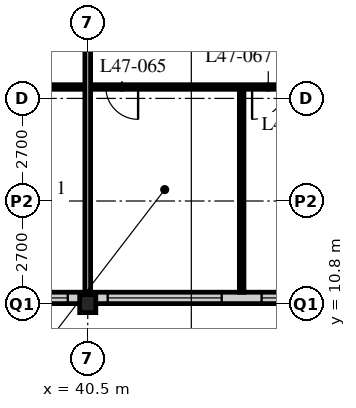
"""IFC4 building model, lengths in metres.
Left out: names, types, materials, properties, quantities, classifications, styles, units other than length and angle.
Written with IfcOpenShell. Run it as: python <this file> out.ifc"""

import sys

from ifc_helpers import new_model, si_unit, direction, frame, frame_2d, origin, origin_2d, place, context, subcontext, project, spatial, rectangle, i_section, extrude, element, fill, save


model = new_model("IFC4")
c1 = context("Model", 3, precision=1e-05, world=origin(), true_north=direction((0.0, 1.0)))
c2 = subcontext(c1, "Body", "Model", "MODEL_VIEW")
j1 = project(units=[si_unit("LENGTHUNIT", "METRE"), si_unit("PLANEANGLEUNIT", "RADIAN")], contexts=[c1])
p1 = place(None, origin())
s1 = spatial("IfcSite", under=j1, at=p1, CompositionType="ELEMENT")
p2 = place(p1, origin())
s2 = spatial("IfcBuilding", under=s1, at=p2, CompositionType="ELEMENT")
p3 = place(p2, frame((0.0, 0.0, 184.8)))
s3 = spatial("IfcBuildingStorey", under=s2, at=p3, CompositionType="ELEMENT", Elevation=184.8)
p4 = place(p3, frame((40.5, 10.8, 0.0), z_axis=(0.0, 0.0, 1.0), x_axis=(1.0, 0.0, 0.0)))
e1 = element("IfcColumn", 1, at=p4, inside=s3, PredefinedType="COLUMN", context=c2, shape_type="SweptSolid", body=[
    extrude(i_section(OverallWidth=0.424, OverallDepth=0.475, WebThickness=0.048, FlangeThickness=0.077, FilletRadius=0.015, at=origin_2d()), origin(), (0.0, 0.0, 1.0), 3.6),
])
p5 = place(p3, frame((8.4, 10.95, 0.0), z_axis=(0.0, 0.0, 1.0), x_axis=(1.0, 0.0, 0.0)))
e2 = element("IfcWall", 2, at=p5, inside=s3, PredefinedType="SOLIDWALL", context=c2, shape_type="SweptSolid", body=[
    extrude(rectangle(XDim=40.2, YDim=0.3, at=frame_2d((20.1, 0.0))), origin(), (0.0, 0.0, 1.0), 3.39),
])
p6 = place(p5, frame((0.225, 0.0, 0.6)))
e3 = element("IfcOpeningElement", 3, at=p6, cuts=e2, PredefinedType="OPENING", context=c2, shape_type="SweptSolid", body=[
    extrude(rectangle(XDim=3.0, YDim=2.4, at=frame_2d((1.5, 1.2))), frame((0.0, 0.16, 0.0), z_axis=(0.0, -1.0, 0.0), x_axis=(1.0, 0.0, 0.0)), (0.0, 0.0, 1.0), 0.32),
])
p7 = place(p5, frame((4.275, 0.0, 0.6)))
e4 = element("IfcOpeningElement", 4, at=p7, cuts=e2, PredefinedType="OPENING", context=c2, shape_type="SweptSolid", body=[
    extrude(rectangle(XDim=3.0, YDim=2.4, at=frame_2d((1.5, 1.2))), frame((0.0, 0.16, 0.0), z_axis=(0.0, -1.0, 0.0), x_axis=(1.0, 0.0, 0.0)), (0.0, 0.0, 1.0), 0.32),
])
p8 = place(p5, frame((8.325, 0.0, 0.6)))
e5 = element("IfcOpeningElement", 5, at=p8, cuts=e2, PredefinedType="OPENING", context=c2, shape_type="SweptSolid", body=[
    extrude(rectangle(XDim=3.0, YDim=2.4, at=frame_2d((1.5, 1.2))), frame((0.0, 0.16, 0.0), z_axis=(0.0, -1.0, 0.0), x_axis=(1.0, 0.0, 0.0)), (0.0, 0.0, 1.0), 0.32),
])
p9 = place(p5, frame((12.375, 0.0, 0.6)))
e6 = element("IfcOpeningElement", 6, at=p9, cuts=e2, PredefinedType="OPENING", context=c2, shape_type="SweptSolid", body=[
    extrude(rectangle(XDim=3.0, YDim=2.4, at=frame_2d((1.5, 1.2))), frame((0.0, 0.16, 0.0), z_axis=(0.0, -1.0, 0.0), x_axis=(1.0, 0.0, 0.0)), (0.0, 0.0, 1.0), 0.32),
])
p10 = place(p5, frame((16.425, 0.0, 0.6)))
e7 = element("IfcOpeningElement", 7, at=p10, cuts=e2, PredefinedType="OPENING", context=c2, shape_type="SweptSolid", body=[
    extrude(rectangle(XDim=3.0, YDim=2.4, at=frame_2d((1.5, 1.2))), frame((0.0, 0.16, 0.0), z_axis=(0.0, -1.0, 0.0), x_axis=(1.0, 0.0, 0.0)), (0.0, 0.0, 1.0), 0.32),
])
p11 = place(p5, frame((20.475, 0.0, 0.6)))
e8 = element("IfcOpeningElement", 8, at=p11, cuts=e2, PredefinedType="OPENING", context=c2, shape_type="SweptSolid", body=[
    extrude(rectangle(XDim=3.0, YDim=2.4, at=frame_2d((1.5, 1.2))), frame((0.0, 0.16, 0.0), z_axis=(0.0, -1.0, 0.0), x_axis=(1.0, 0.0, 0.0)), (0.0, 0.0, 1.0), 0.32),
])
p12 = place(p5, frame((24.525, 0.0, 0.6)))
e9 = element("IfcOpeningElement", 9, at=p12, cuts=e2, PredefinedType="OPENING", context=c2, shape_type="SweptSolid", body=[
    extrude(rectangle(XDim=3.0, YDim=2.4, at=frame_2d((1.5, 1.2))), frame((0.0, 0.16, 0.0), z_axis=(0.0, -1.0, 0.0), x_axis=(1.0, 0.0, 0.0)), (0.0, 0.0, 1.0), 0.32),
])
p13 = place(p5, frame((28.575, 0.0, 0.6)))
e10 = element("IfcOpeningElement", 10, at=p13, cuts=e2, PredefinedType="OPENING", context=c2, shape_type="SweptSolid", body=[
    extrude(rectangle(XDim=3.0, YDim=2.4, at=frame_2d((1.5, 1.2))), frame((0.0, 0.16, 0.0), z_axis=(0.0, -1.0, 0.0), x_axis=(1.0, 0.0, 0.0)), (0.0, 0.0, 1.0), 0.32),
])
p14 = place(p5, frame((32.625, 0.0, 0.6)))
e11 = element("IfcOpeningElement", 11, at=p14, cuts=e2, PredefinedType="OPENING", context=c2, shape_type="SweptSolid", body=[
    extrude(rectangle(XDim=3.0, YDim=2.4, at=frame_2d((1.5, 1.2))), frame((0.0, 0.16, 0.0), z_axis=(0.0, -1.0, 0.0), x_axis=(1.0, 0.0, 0.0)), (0.0, 0.0, 1.0), 0.32),
])
p15 = place(p5, frame((36.675, 0.0, 0.6)))
e12 = element("IfcOpeningElement", 12, at=p15, cuts=e2, PredefinedType="OPENING", context=c2, shape_type="SweptSolid", body=[
    extrude(rectangle(XDim=3.0, YDim=2.4, at=frame_2d((1.5, 1.2))), frame((0.0, 0.16, 0.0), z_axis=(0.0, -1.0, 0.0), x_axis=(1.0, 0.0, 0.0)), (0.0, 0.0, 1.0), 0.32),
])
p16 = place(p3, frame((8.15, 16.5, 0.0), z_axis=(0.0, 0.0, 1.0), x_axis=(1.0, 0.0, 0.0)))
e13 = element("IfcWall", 13, at=p16, inside=s3, PredefinedType="PARTITIONING", context=c2, shape_type="SweptSolid", body=[
    extrude(rectangle(XDim=40.4, YDim=0.12, at=frame_2d((20.2, 0.0))), origin(), (0.0, 0.0, 1.0), 3.39),
])
p17 = place(p16, frame((9.025, 0.0, 0.0)))
e14 = element("IfcOpeningElement", 14, at=p17, cuts=e13, PredefinedType="OPENING", context=c2, shape_type="SweptSolid", body=[
    extrude(rectangle(XDim=0.85, YDim=2.1, at=frame_2d((0.425, 1.05))), frame((0.0, 0.07, 0.0), z_axis=(0.0, -1.0, 0.0), x_axis=(1.0, 0.0, 0.0)), (0.0, 0.0, 1.0), 0.14),
])
p18 = place(p16, frame((12.425, 0.0, 0.0)))
e15 = element("IfcOpeningElement", 15, at=p18, cuts=e13, PredefinedType="OPENING", context=c2, shape_type="SweptSolid", body=[
    extrude(rectangle(XDim=0.85, YDim=2.1, at=frame_2d((0.425, 1.05))), frame((0.0, 0.07, 0.0), z_axis=(0.0, -1.0, 0.0), x_axis=(1.0, 0.0, 0.0)), (0.0, 0.0, 1.0), 0.14),
])
p19 = place(p16, frame((17.125, 0.0, 0.0)))
e16 = element("IfcOpeningElement", 16, at=p19, cuts=e13, PredefinedType="OPENING", context=c2, shape_type="SweptSolid", body=[
    extrude(rectangle(XDim=0.85, YDim=2.1, at=frame_2d((0.425, 1.05))), frame((0.0, 0.07, 0.0), z_axis=(0.0, -1.0, 0.0), x_axis=(1.0, 0.0, 0.0)), (0.0, 0.0, 1.0), 0.14),
])
p20 = place(p16, frame((20.525, 0.0, 0.0)))
e17 = element("IfcOpeningElement", 17, at=p20, cuts=e13, PredefinedType="OPENING", context=c2, shape_type="SweptSolid", body=[
    extrude(rectangle(XDim=0.85, YDim=2.1, at=frame_2d((0.425, 1.05))), frame((0.0, 0.07, 0.0), z_axis=(0.0, -1.0, 0.0), x_axis=(1.0, 0.0, 0.0)), (0.0, 0.0, 1.0), 0.14),
])
p21 = place(p16, frame((25.225, 0.0, 0.0)))
e18 = element("IfcOpeningElement", 18, at=p21, cuts=e13, PredefinedType="OPENING", context=c2, shape_type="SweptSolid", body=[
    extrude(rectangle(XDim=0.85, YDim=2.1, at=frame_2d((0.425, 1.05))), frame((0.0, 0.07, 0.0), z_axis=(0.0, -1.0, 0.0), x_axis=(1.0, 0.0, 0.0)), (0.0, 0.0, 1.0), 0.14),
])
p22 = place(p16, frame((28.625, 0.0, 0.0)))
e19 = element("IfcOpeningElement", 19, at=p22, cuts=e13, PredefinedType="OPENING", context=c2, shape_type="SweptSolid", body=[
    extrude(rectangle(XDim=0.85, YDim=2.1, at=frame_2d((0.425, 1.05))), frame((0.0, 0.07, 0.0), z_axis=(0.0, -1.0, 0.0), x_axis=(1.0, 0.0, 0.0)), (0.0, 0.0, 1.0), 0.14),
])
p23 = place(p16, frame((6.725, 0.0, 0.0)))
e20 = element("IfcOpeningElement", 20, at=p23, cuts=e13, PredefinedType="OPENING", context=c2, shape_type="SweptSolid", body=[
    extrude(rectangle(XDim=0.85, YDim=2.1, at=frame_2d((0.425, 1.05))), frame((0.0, 0.07, 0.0), z_axis=(0.0, -1.0, 0.0), x_axis=(1.0, 0.0, 0.0)), (0.0, 0.0, 1.0), 0.14),
])
p24 = place(p16, frame((2.875, 0.0, 0.0)))
e21 = element("IfcOpeningElement", 21, at=p24, cuts=e13, PredefinedType="OPENING", context=c2, shape_type="SweptSolid", body=[
    extrude(rectangle(XDim=0.85, YDim=2.1, at=frame_2d((0.425, 1.05))), frame((0.0, 0.07, 0.0), z_axis=(0.0, -1.0, 0.0), x_axis=(1.0, 0.0, 0.0)), (0.0, 0.0, 1.0), 0.14),
])
p25 = place(p16, frame((32.825, 0.0, 0.0)))
e22 = element("IfcOpeningElement", 22, at=p25, cuts=e13, PredefinedType="OPENING", context=c2, shape_type="SweptSolid", body=[
    extrude(rectangle(XDim=0.85, YDim=2.1, at=frame_2d((0.425, 1.05))), frame((0.0, 0.07, 0.0), z_axis=(0.0, -1.0, 0.0), x_axis=(1.0, 0.0, 0.0)), (0.0, 0.0, 1.0), 0.14),
])
p26 = place(p16, frame((36.675, 0.0, 0.0)))
e23 = element("IfcOpeningElement", 23, at=p26, cuts=e13, PredefinedType="OPENING", context=c2, shape_type="SweptSolid", body=[
    extrude(rectangle(XDim=0.85, YDim=2.1, at=frame_2d((0.425, 1.05))), frame((0.0, 0.07, 0.0), z_axis=(0.0, -1.0, 0.0), x_axis=(1.0, 0.0, 0.0)), (0.0, 0.0, 1.0), 0.14),
])
p27 = place(p3, frame((44.55, 16.5, 0.0), z_axis=(0.0, 0.0, 1.0), x_axis=(0.0, -1.0, 0.0)))
e24 = element("IfcWall", 24, at=p27, inside=s3, PredefinedType="PARTITIONING", context=c2, shape_type="SweptSolid", body=[
    extrude(rectangle(XDim=5.4, YDim=0.12, at=frame_2d((2.7, 0.0))), origin(), (0.0, 0.0, 1.0), 3.39),
])
p28 = place(p3, frame((40.5, 18.9, 0.0), z_axis=(0.0, 0.0, 1.0), x_axis=(0.0, -1.0, 0.0)))
e25 = element("IfcWall", 25, at=p28, inside=s3, PredefinedType="PARTITIONING", context=c2, shape_type="SweptSolid", body=[
    extrude(rectangle(XDim=7.8, YDim=0.15, at=frame_2d((3.9, 0.0))), origin(), (0.0, 0.0, 1.0), 2.778),
])
p29 = place(p13, origin())
e26 = element("IfcWindow", 26, at=p29, inside=s3, PartitioningType="SINGLE_PANEL", PredefinedType="WINDOW", context=c2, shape_type="SweptSolid", body=[
    extrude(rectangle(XDim=3.0, YDim=2.4, at=frame_2d((1.5, 1.2))), frame((0.0, 0.03, 0.0), z_axis=(0.0, -1.0, 0.0), x_axis=(1.0, 0.0, 0.0)), (0.0, 0.0, 1.0), 0.06),
])
fill(e10, e26)
p30 = place(p14, origin())
e27 = element("IfcWindow", 27, at=p30, inside=s3, PartitioningType="SINGLE_PANEL", PredefinedType="WINDOW", context=c2, shape_type="SweptSolid", body=[
    extrude(rectangle(XDim=3.0, YDim=2.4, at=frame_2d((1.5, 1.2))), frame((0.0, 0.03, 0.0), z_axis=(0.0, -1.0, 0.0), x_axis=(1.0, 0.0, 0.0)), (0.0, 0.0, 1.0), 0.06),
])
fill(e11, e27)
p31 = place(p15, origin())
e28 = element("IfcWindow", 28, at=p31, inside=s3, PartitioningType="SINGLE_PANEL", PredefinedType="WINDOW", context=c2, shape_type="SweptSolid", body=[
    extrude(rectangle(XDim=3.0, YDim=2.4, at=frame_2d((1.5, 1.2))), frame((0.0, 0.03, 0.0), z_axis=(0.0, -1.0, 0.0), x_axis=(1.0, 0.0, 0.0)), (0.0, 0.0, 1.0), 0.06),
])
fill(e12, e28)
p32 = place(p25, origin())
e29 = element("IfcDoor", 29, at=p32, inside=s3, OperationType="SINGLE_SWING_LEFT", PredefinedType="DOOR", context=c2, shape_type="SweptSolid", body=[
    extrude(rectangle(XDim=0.85, YDim=2.1, at=frame_2d((0.425, 1.05))), frame((0.0, 0.025, 0.0), z_axis=(0.0, -1.0, 0.0), x_axis=(1.0, 0.0, 0.0)), (0.0, 0.0, 1.0), 0.05),
])
fill(e22, e29)
p33 = place(p26, origin())
e30 = element("IfcDoor", 30, at=p33, inside=s3, OperationType="SINGLE_SWING_RIGHT", PredefinedType="DOOR", context=c2, shape_type="SweptSolid", body=[
    extrude(rectangle(XDim=0.85, YDim=2.1, at=frame_2d((0.425, 1.05))), frame((0.0, 0.025, 0.0), z_axis=(0.0, -1.0, 0.0), x_axis=(1.0, 0.0, 0.0)), (0.0, 0.0, 1.0), 0.05),
])
fill(e23, e30)
save(model, sys.argv[1])
